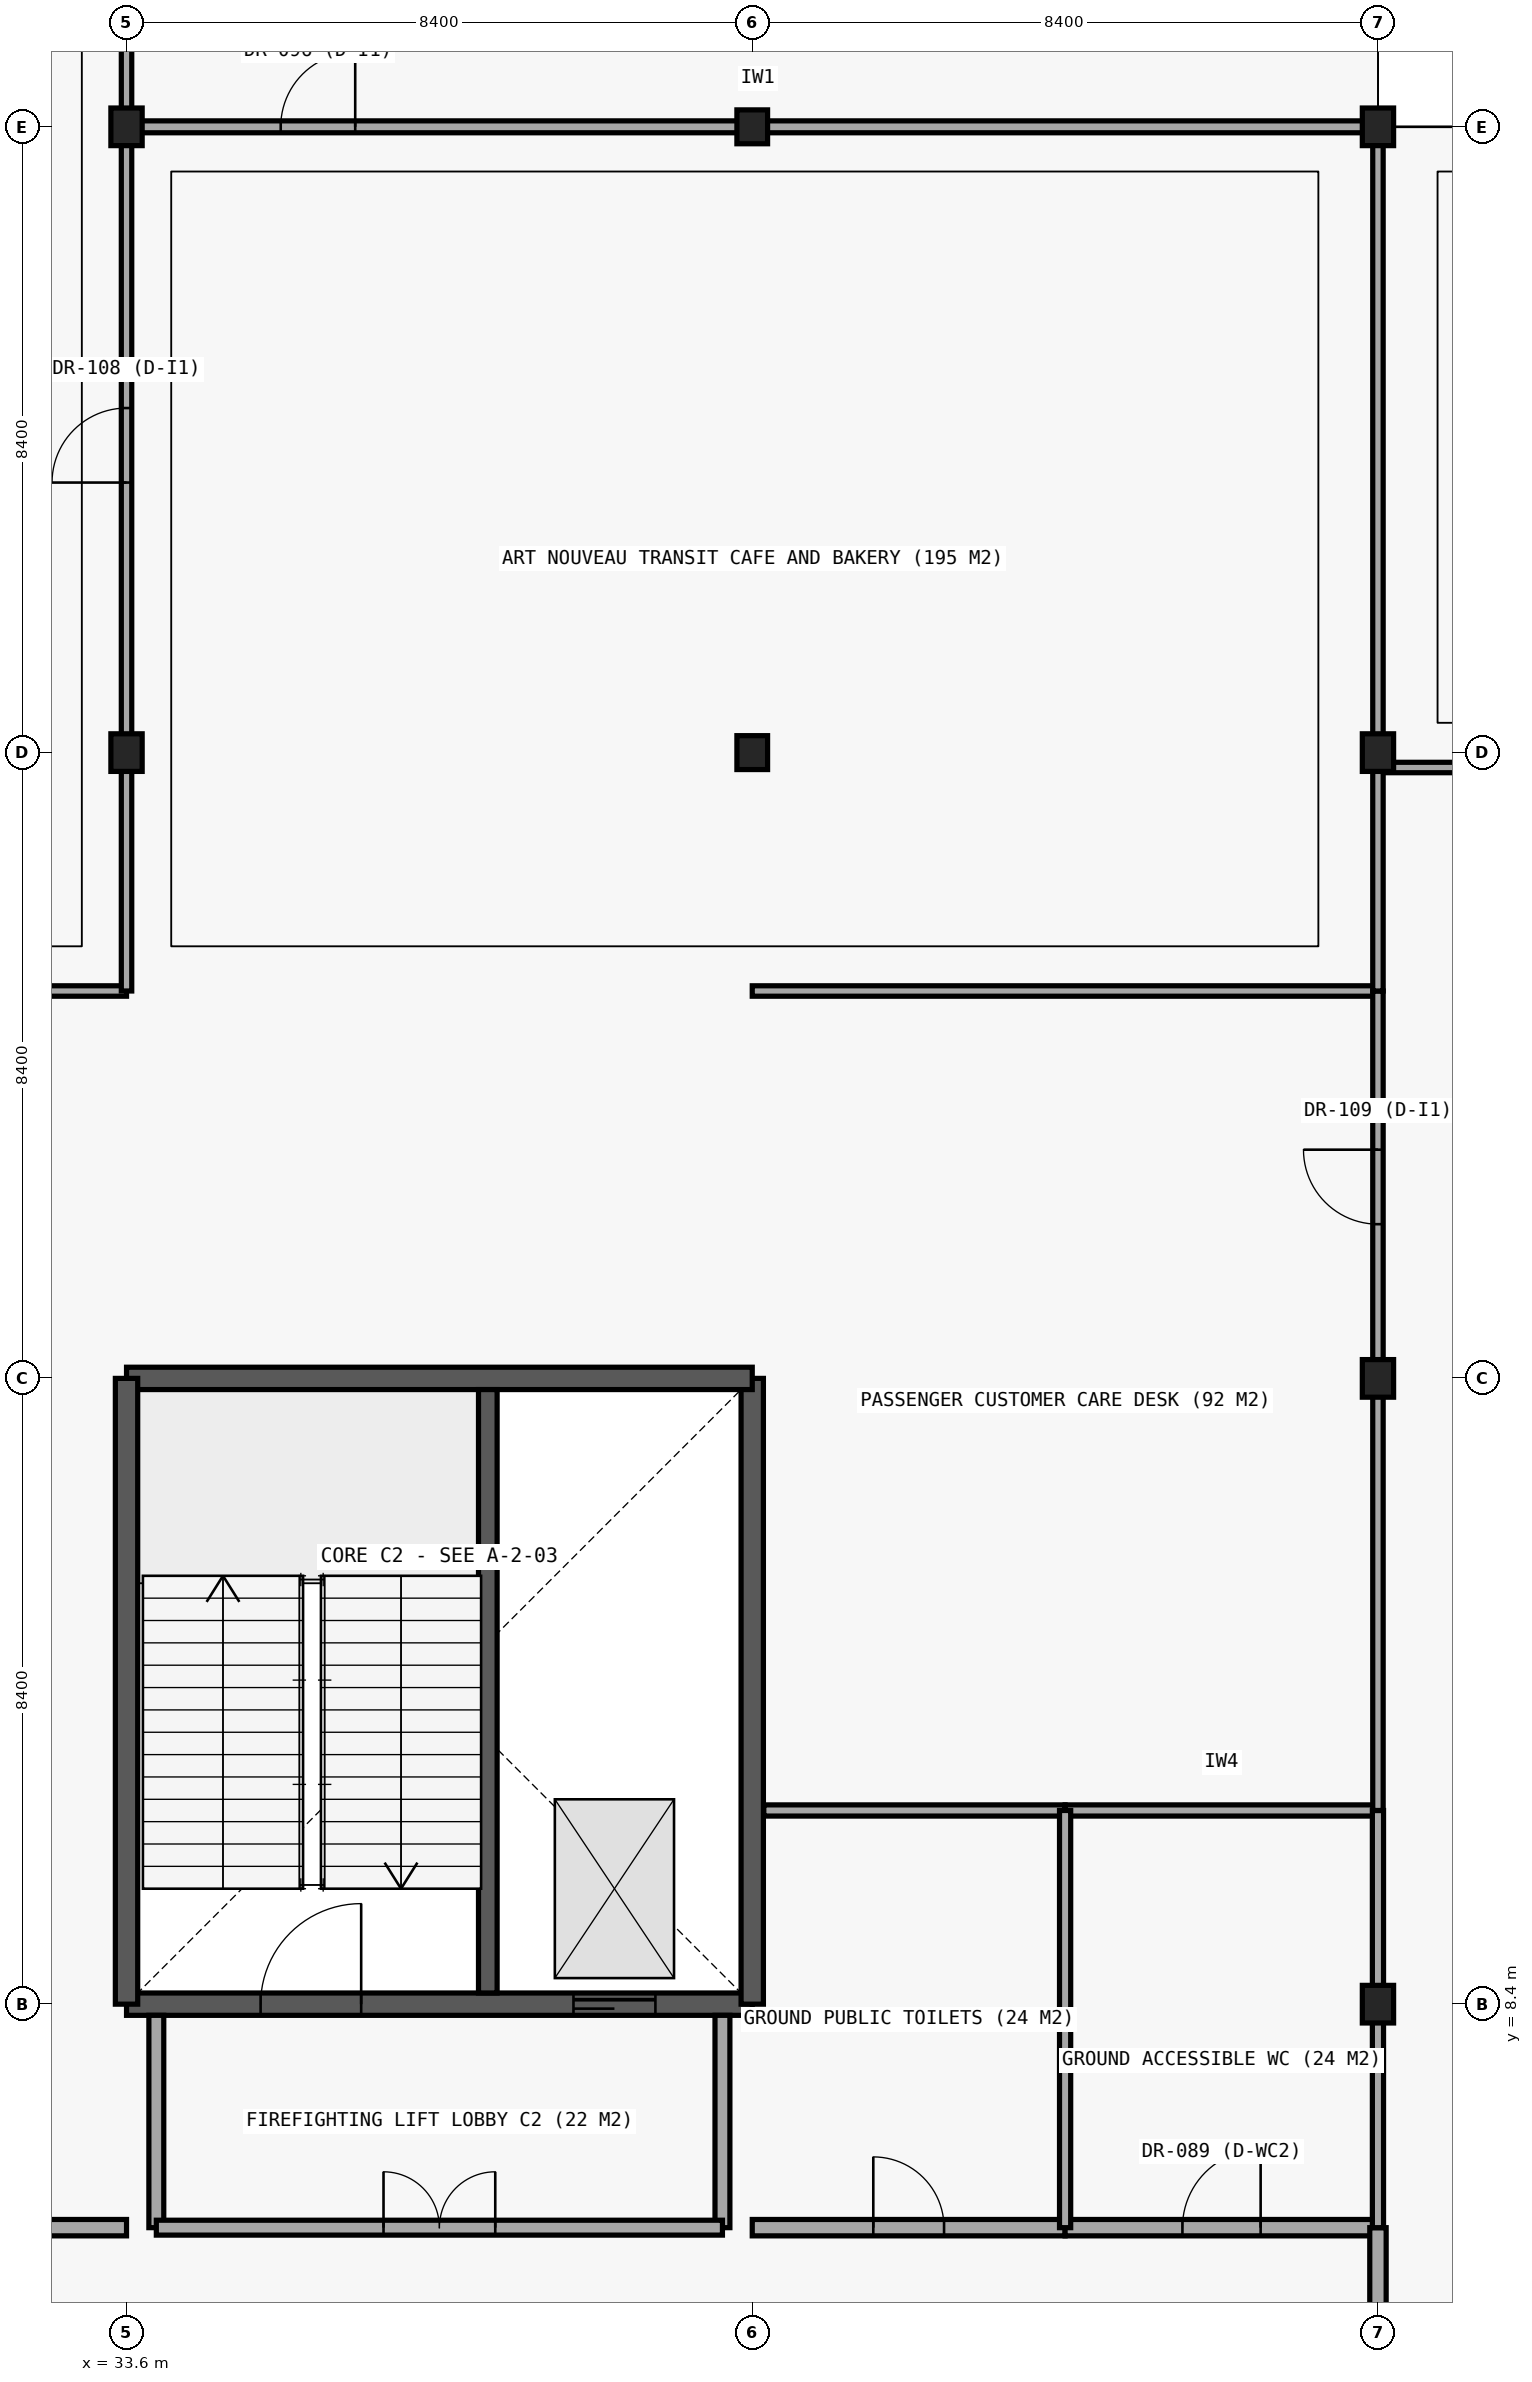
"""IFC4 building model, lengths in metres.
Left out: names, types, materials, properties, quantities, classifications, styles, units other than length and angle.
Written with IfcOpenShell. Run it as: python <this file> out.ifc"""

import sys

from ifc_helpers import new_model, si_unit, direction, frame, frame_2d, origin, origin_2d, place, context, subcontext, project, spatial, rectangle, i_section, extrude, element, fill, save


model = new_model("IFC4")
c1 = context("Model", 3, precision=1e-05, world=origin(), true_north=direction((0.0, 1.0)))
c2 = subcontext(c1, "Body", "Model", "MODEL_VIEW")
j1 = project(units=[si_unit("LENGTHUNIT", "METRE"), si_unit("PLANEANGLEUNIT", "RADIAN")], contexts=[c1])
p1 = place(None, origin())
s1 = spatial("IfcSite", under=j1, at=p1, CompositionType="ELEMENT")
p2 = place(p1, origin())
s2 = spatial("IfcBuilding", under=s1, at=p2, CompositionType="ELEMENT")
p3 = place(p2, origin())
s3 = spatial("IfcBuildingStorey", under=s2, at=p3, CompositionType="ELEMENT", Elevation=0.0)
p4 = place(p3, frame((33.6, 8.4, 0.0), z_axis=(0.0, 0.0, 1.0), x_axis=(1.0, 0.0, 0.0)))
e1 = element("IfcWall", 1, at=p4, inside=s3, PredefinedType="SHEAR", context=c2, shape_type="SweptSolid", body=[
    extrude(rectangle(XDim=8.4, YDim=0.3, at=frame_2d((4.2, 0.0))), origin(), (0.0, 0.0, 1.0), 4.8),
])
p5 = place(p4, frame((1.8, 0.0, 0.0)))
e2 = element("IfcOpeningElement", 2, at=p5, cuts=e1, PredefinedType="OPENING", context=c2, shape_type="SweptSolid", body=[
    extrude(rectangle(XDim=1.35, YDim=2.2, at=frame_2d((0.675, 1.1))), frame((0.0, 0.16, 0.0), z_axis=(0.0, -1.0, 0.0), x_axis=(1.0, 0.0, 0.0)), (0.0, 0.0, 1.0), 0.32),
])
p6 = place(p4, frame((6.0, 0.0, 0.0)))
e3 = element("IfcOpeningElement", 3, at=p6, cuts=e1, PredefinedType="OPENING", context=c2, shape_type="SweptSolid", body=[
    extrude(rectangle(XDim=1.1, YDim=2.2, at=frame_2d((0.55, 1.1))), frame((0.0, 0.16, 0.0), z_axis=(0.0, -1.0, 0.0), x_axis=(1.0, 0.0, 0.0)), (0.0, 0.0, 1.0), 0.32),
])
p7 = place(p3, frame((42.0, 8.4, 0.0), z_axis=(0.0, 0.0, 1.0), x_axis=(0.0, 1.0, 0.0)))
e4 = element("IfcWall", 4, at=p7, inside=s3, PredefinedType="SHEAR", context=c2, shape_type="SweptSolid", body=[
    extrude(rectangle(XDim=8.4, YDim=0.3, at=frame_2d((4.2, 0.0))), origin(), (0.0, 0.0, 1.0), 4.8),
])
p8 = place(p3, frame((42.0, 16.8, 0.0), z_axis=(0.0, 0.0, 1.0), x_axis=(-1.0, 0.0, 0.0)))
e5 = element("IfcWall", 5, at=p8, inside=s3, PredefinedType="SHEAR", context=c2, shape_type="SweptSolid", body=[
    extrude(rectangle(XDim=8.4, YDim=0.3, at=frame_2d((4.2, 0.0))), origin(), (0.0, 0.0, 1.0), 4.8),
])
p9 = place(p3, frame((33.6, 16.8, 0.0), z_axis=(0.0, 0.0, 1.0), x_axis=(0.0, -1.0, 0.0)))
e6 = element("IfcWall", 6, at=p9, inside=s3, PredefinedType="SHEAR", context=c2, shape_type="SweptSolid", body=[
    extrude(rectangle(XDim=8.4, YDim=0.3, at=frame_2d((4.2, 0.0))), origin(), (0.0, 0.0, 1.0), 4.8),
])
p10 = place(p3, frame((38.45, 8.55, 0.0), z_axis=(0.0, 0.0, 1.0), x_axis=(0.0, 1.0, 0.0)))
e7 = element("IfcWall", 7, at=p10, inside=s3, PredefinedType="SHEAR", context=c2, shape_type="SweptSolid", body=[
    extrude(rectangle(XDim=8.1, YDim=0.25, at=frame_2d((4.05, 0.0))), origin(), (0.0, 0.0, 1.0), 4.8),
])
for number, where, z_axis, x_axis in (
    (8, (33.6, 25.2, 0.0), (0.0, 0.0, 1.0), (1.0, 0.0, 0.0)),
    (9, (33.6, 33.6, 0.0), (0.0, 0.0, 1.0), (1.0, 0.0, 0.0)),
):
    element("IfcColumn", number, at=place(p3, frame(where, z_axis=z_axis, x_axis=x_axis)), inside=s3, PredefinedType="COLUMN", context=c2, shape_type="SweptSolid", body=[
        extrude(i_section(OverallWidth=0.42, OverallDepth=0.505, WebThickness=0.037, FlangeThickness=0.059, FilletRadius=0.015, at=origin_2d()), origin(), (0.0, 0.0, 1.0), 4.8),
    ])
for number, where, z_axis, x_axis in (
    (10, (42.0, 25.2, 0.0), (0.0, 0.0, 1.0), (1.0, 0.0, 0.0)),
    (11, (42.0, 33.6, 0.0), (0.0, 0.0, 1.0), (1.0, 0.0, 0.0)),
):
    element("IfcColumn", number, at=place(p3, frame(where, z_axis=z_axis, x_axis=x_axis)), inside=s3, PredefinedType="COLUMN", context=c2, shape_type="SweptSolid", body=[
        extrude(i_section(OverallWidth=0.412, OverallDepth=0.455, WebThickness=0.031, FlangeThickness=0.049, FilletRadius=0.015, at=origin_2d()), origin(), (0.0, 0.0, 1.0), 4.8),
    ])
for number, where, z_axis, x_axis in (
    (12, (50.4, 8.4, 0.0), (0.0, 0.0, 1.0), (1.0, 0.0, 0.0)),
    (13, (50.4, 16.8, 0.0), (0.0, 0.0, 1.0), (1.0, 0.0, 0.0)),
    (14, (50.4, 25.2, 0.0), (0.0, 0.0, 1.0), (1.0, 0.0, 0.0)),
    (15, (50.4, 33.6, 0.0), (0.0, 0.0, 1.0), (1.0, 0.0, 0.0)),
):
    element("IfcColumn", number, at=place(p3, frame(where, z_axis=z_axis, x_axis=x_axis)), inside=s3, PredefinedType="COLUMN", context=c2, shape_type="SweptSolid", body=[
        extrude(i_section(OverallWidth=0.42, OverallDepth=0.505, WebThickness=0.037, FlangeThickness=0.059, FilletRadius=0.015, at=origin_2d()), origin(), (0.0, 0.0, 1.0), 4.8),
    ])
for number, where, z_axis, x_axis in (
    (16, (34.0, 5.4, 0.0), (0.0, 0.0, 1.0), (0.0, 1.0, 0.0)),
    (17, (41.6, 5.4, 0.0), (0.0, 0.0, 1.0), (0.0, 1.0, 0.0)),
):
    element("IfcWall", number, at=place(p3, frame(where, z_axis=z_axis, x_axis=x_axis)), inside=s3, PredefinedType="PARTITIONING", context=c2, shape_type="SweptSolid", body=[
        extrude(rectangle(XDim=2.85, YDim=0.2, at=frame_2d((1.425, 0.0))), origin(), (0.0, 0.0, 1.0), 4.09),
    ])
p11 = place(p3, frame((34.0, 5.4, 0.0), z_axis=(0.0, 0.0, 1.0), x_axis=(1.0, 0.0, 0.0)))
e18 = element("IfcWall", 18, at=p11, inside=s3, PredefinedType="PARTITIONING", context=c2, shape_type="SweptSolid", body=[
    extrude(rectangle(XDim=7.6, YDim=0.2, at=frame_2d((3.8, 0.0))), origin(), (0.0, 0.0, 1.0), 4.12),
])
p12 = place(p11, frame((3.05, 0.0, 0.0)))
e19 = element("IfcOpeningElement", 19, at=p12, cuts=e18, PredefinedType="OPENING", context=c2, shape_type="SweptSolid", body=[
    extrude(rectangle(XDim=1.5, YDim=2.2, at=frame_2d((0.75, 1.1))), frame((0.0, 0.11, 0.0), z_axis=(0.0, -1.0, 0.0), x_axis=(1.0, 0.0, 0.0)), (0.0, 0.0, 1.0), 0.22),
])
p13 = place(p3, frame((22.2, 5.4, 0.0), z_axis=(0.0, 0.0, 1.0), x_axis=(1.0, 0.0, 0.0)))
e20 = element("IfcWall", 20, at=p13, inside=s3, PredefinedType="PARTITIONING", context=c2, shape_type="SweptSolid", body=[
    extrude(rectangle(XDim=11.4, YDim=0.22, at=frame_2d((5.7, 0.0))), origin(), (0.0, 0.0, 1.0), 4.1),
])
p14 = place(p3, frame((42.0, 5.4, 0.0), z_axis=(0.0, 0.0, 1.0), x_axis=(1.0, 0.0, 0.0)))
e21 = element("IfcWall", 21, at=p14, inside=s3, PredefinedType="PARTITIONING", context=c2, shape_type="SweptSolid", body=[
    extrude(rectangle(XDim=4.2, YDim=0.22, at=frame_2d((2.1, 0.0))), origin(), (0.0, 0.0, 1.0), 4.1),
])
p15 = place(p14, frame((1.625, 0.0, 0.0)))
e22 = element("IfcOpeningElement", 22, at=p15, cuts=e21, PredefinedType="OPENING", context=c2, shape_type="SweptSolid", body=[
    extrude(rectangle(XDim=0.95, YDim=2.1, at=frame_2d((0.475, 1.05))), frame((0.0, 0.12, 0.0), z_axis=(0.0, -1.0, 0.0), x_axis=(1.0, 0.0, 0.0)), (0.0, 0.0, 1.0), 0.24),
])
p16 = place(p3, frame((46.2, 5.4, 0.0), z_axis=(0.0, 0.0, 1.0), x_axis=(1.0, 0.0, 0.0)))
e23 = element("IfcWall", 23, at=p16, inside=s3, PredefinedType="PARTITIONING", context=c2, shape_type="SweptSolid", body=[
    extrude(rectangle(XDim=4.2, YDim=0.22, at=frame_2d((2.1, 0.0))), origin(), (0.0, 0.0, 1.0), 4.1),
])
p17 = place(p16, frame((1.575, 0.0, 0.0)))
e24 = element("IfcOpeningElement", 24, at=p17, cuts=e23, PredefinedType="OPENING", context=c2, shape_type="SweptSolid", body=[
    extrude(rectangle(XDim=1.05, YDim=2.15, at=frame_2d((0.525, 1.075))), frame((0.0, 0.12, 0.0), z_axis=(0.0, -1.0, 0.0), x_axis=(1.0, 0.0, 0.0)), (0.0, 0.0, 1.0), 0.24),
])
p18 = place(p3, frame((42.155, 11.0, 0.0), z_axis=(0.0, 0.0, 1.0), x_axis=(1.0, 0.0, 0.0)))
e25 = element("IfcWall", 25, at=p18, inside=s3, PredefinedType="PARTITIONING", context=c2, shape_type="SweptSolid", body=[
    extrude(rectangle(XDim=4.045, YDim=0.15, at=frame_2d((2.022, 0.0))), origin(), (0.0, 0.0, 1.0), 4.1),
])
p19 = place(p3, frame((46.2, 11.0, 0.0), z_axis=(0.0, 0.0, 1.0), x_axis=(1.0, 0.0, 0.0)))
e26 = element("IfcWall", 26, at=p19, inside=s3, PredefinedType="PARTITIONING", context=c2, shape_type="SweptSolid", body=[
    extrude(rectangle(XDim=4.2, YDim=0.15, at=frame_2d((2.1, 0.0))), origin(), (0.0, 0.0, 1.0), 4.1),
])
p20 = place(p3, frame((22.2, 22.0, 0.0), z_axis=(0.0, 0.0, 1.0), x_axis=(1.0, 0.0, 0.0)))
e27 = element("IfcWall", 27, at=p20, inside=s3, PredefinedType="PARTITIONING", context=c2, shape_type="SweptSolid", body=[
    extrude(rectangle(XDim=11.4, YDim=0.14, at=frame_2d((5.7, 0.0))), origin(), (0.0, 0.0, 1.0), 4.1),
])
p21 = place(p3, frame((42.0, 22.0, 0.0), z_axis=(0.0, 0.0, 1.0), x_axis=(1.0, 0.0, 0.0)))
e28 = element("IfcWall", 28, at=p21, inside=s3, PredefinedType="PARTITIONING", context=c2, shape_type="SweptSolid", body=[
    extrude(rectangle(XDim=8.4, YDim=0.14, at=frame_2d((4.2, 0.0))), origin(), (0.0, 0.0, 1.0), 4.1),
])
p22 = place(p3, frame((50.4, 25.0, 0.0), z_axis=(0.0, 0.0, 1.0), x_axis=(1.0, 0.0, 0.0)))
e29 = element("IfcWall", 29, at=p22, inside=s3, PredefinedType="PARTITIONING", context=c2, shape_type="SweptSolid", body=[
    extrude(rectangle(XDim=8.55, YDim=0.14, at=frame_2d((4.275, 0.0))), origin(), (0.0, 0.0, 1.0), 4.1),
])
p23 = place(p3, frame((33.75, 33.6, 0.0), z_axis=(0.0, 0.0, 1.0), x_axis=(1.0, 0.0, 0.0)))
e30 = element("IfcWall", 30, at=p23, inside=s3, PredefinedType="PARTITIONING", context=c2, shape_type="SweptSolid", body=[
    extrude(rectangle(XDim=16.65, YDim=0.16, at=frame_2d((8.325, 0.0))), origin(), (0.0, 0.0, 1.0), 4.04),
])
p24 = place(p23, frame((1.92, 0.0, 0.0)))
e31 = element("IfcOpeningElement", 31, at=p24, cuts=e30, PredefinedType="OPENING", context=c2, shape_type="SweptSolid", body=[
    extrude(rectangle(XDim=1.0, YDim=2.15, at=frame_2d((0.5, 1.075))), frame((0.0, 0.09, 0.0), z_axis=(0.0, -1.0, 0.0), x_axis=(1.0, 0.0, 0.0)), (0.0, 0.0, 1.0), 0.18),
])
p25 = place(p3, frame((33.6, 22.0, 0.0), z_axis=(0.0, 0.0, 1.0), x_axis=(0.0, 1.0, 0.0)))
e32 = element("IfcWall", 32, at=p25, inside=s3, PredefinedType="PARTITIONING", context=c2, shape_type="SweptSolid", body=[
    extrude(rectangle(XDim=3.0, YDim=0.14, at=frame_2d((1.5, 0.0))), origin(), (0.0, 0.0, 1.0), 4.09),
])
p26 = place(p3, frame((33.6, 25.05, 0.0), z_axis=(0.0, 0.0, 1.0), x_axis=(0.0, 1.0, 0.0)))
e33 = element("IfcWall", 33, at=p26, inside=s3, PredefinedType="PARTITIONING", context=c2, shape_type="SweptSolid", body=[
    extrude(rectangle(XDim=8.55, YDim=0.14, at=frame_2d((4.275, 0.0))), origin(), (0.0, 0.0, 1.0), 4.09),
])
p27 = place(p26, frame((3.775, 0.0, 0.0)))
e34 = element("IfcOpeningElement", 34, at=p27, cuts=e33, PredefinedType="OPENING", context=c2, shape_type="SweptSolid", body=[
    extrude(rectangle(XDim=1.0, YDim=2.15, at=frame_2d((0.5, 1.075))), frame((0.0, 0.08, 0.0), z_axis=(0.0, -1.0, 0.0), x_axis=(1.0, 0.0, 0.0)), (0.0, 0.0, 1.0), 0.16),
])
p28 = place(p3, frame((33.6, 33.6, 0.0), z_axis=(0.0, 0.0, 1.0), x_axis=(0.0, 1.0, 0.0)))
e35 = element("IfcWall", 35, at=p28, inside=s3, PredefinedType="PARTITIONING", context=c2, shape_type="SweptSolid", body=[
    extrude(rectangle(XDim=8.355, YDim=0.14, at=frame_2d((4.177, 0.0))), origin(), (0.0, 0.0, 1.0), 4.09),
])
p29 = place(p3, frame((46.2, 5.4, 0.0), z_axis=(0.0, 0.0, 1.0), x_axis=(0.0, 1.0, 0.0)))
e36 = element("IfcWall", 36, at=p29, inside=s3, PredefinedType="PARTITIONING", context=c2, shape_type="SweptSolid", body=[
    extrude(rectangle(XDim=5.6, YDim=0.15, at=frame_2d((2.8, 0.0))), origin(), (0.0, 0.0, 1.0), 4.1),
])
p30 = place(p3, frame((50.4, 3.415, 0.0), z_axis=(0.0, 0.0, 1.0), x_axis=(0.0, 1.0, 0.0)))
e37 = element("IfcWall", 37, at=p30, inside=s3, PredefinedType="PARTITIONING", context=c2, shape_type="SweptSolid", body=[
    extrude(rectangle(XDim=1.985, YDim=0.22, at=frame_2d((0.992, 0.0))), origin(), (0.0, 0.0, 1.0), 4.1),
])
p31 = place(p3, frame((50.4, 5.4, 0.0), z_axis=(0.0, 0.0, 1.0), x_axis=(0.0, 1.0, 0.0)))
e38 = element("IfcWall", 38, at=p31, inside=s3, PredefinedType="PARTITIONING", context=c2, shape_type="SweptSolid", body=[
    extrude(rectangle(XDim=5.6, YDim=0.15, at=frame_2d((2.8, 0.0))), origin(), (0.0, 0.0, 1.0), 4.1),
])
p32 = place(p3, frame((50.4, 11.0, 0.0), z_axis=(0.0, 0.0, 1.0), x_axis=(0.0, 1.0, 0.0)))
e39 = element("IfcWall", 39, at=p32, inside=s3, PredefinedType="PARTITIONING", context=c2, shape_type="SweptSolid", body=[
    extrude(rectangle(XDim=11.0, YDim=0.14, at=frame_2d((5.5, 0.0))), origin(), (0.0, 0.0, 1.0), 4.1),
])
p33 = place(p32, frame((7.87, 0.0, 0.0)))
e40 = element("IfcOpeningElement", 40, at=p33, cuts=e39, PredefinedType="OPENING", context=c2, shape_type="SweptSolid", body=[
    extrude(rectangle(XDim=1.0, YDim=2.15, at=frame_2d((0.5, 1.075))), frame((0.0, 0.08, 0.0), z_axis=(0.0, -1.0, 0.0), x_axis=(1.0, 0.0, 0.0)), (0.0, 0.0, 1.0), 0.16),
])
p34 = place(p3, frame((50.4, 22.0, 0.0), z_axis=(0.0, 0.0, 1.0), x_axis=(0.0, 1.0, 0.0)))
e41 = element("IfcWall", 41, at=p34, inside=s3, PredefinedType="PARTITIONING", context=c2, shape_type="SweptSolid", body=[
    extrude(rectangle(XDim=3.0, YDim=0.14, at=frame_2d((1.5, 0.0))), origin(), (0.0, 0.0, 1.0), 4.1),
])
p35 = place(p3, frame((50.4, 25.05, 0.0), z_axis=(0.0, 0.0, 1.0), x_axis=(0.0, 1.0, 0.0)))
e42 = element("IfcWall", 42, at=p35, inside=s3, PredefinedType="PARTITIONING", context=c2, shape_type="SweptSolid", body=[
    extrude(rectangle(XDim=8.505, YDim=0.14, at=frame_2d((4.252, 0.0))), origin(), (0.0, 0.0, 1.0), 4.1),
])
p36 = place(p5, origin())
e43 = element("IfcDoor", 43, at=p36, inside=s3, OperationType="SINGLE_SWING_RIGHT", PredefinedType="DOOR", context=c2, shape_type="SweptSolid", body=[
    extrude(rectangle(XDim=1.35, YDim=2.2, at=frame_2d((0.675, 1.1))), frame((0.0, 0.025, 0.0), z_axis=(0.0, -1.0, 0.0), x_axis=(1.0, 0.0, 0.0)), (0.0, 0.0, 1.0), 0.05),
])
fill(e2, e43)
p37 = place(p6, origin())
e44 = element("IfcDoor", 44, at=p37, inside=s3, OperationType="SLIDING_TO_LEFT", PredefinedType="DOOR", context=c2, shape_type="SweptSolid", body=[
    extrude(rectangle(XDim=1.1, YDim=2.2, at=frame_2d((0.55, 1.1))), frame((0.0, 0.025, 0.0), z_axis=(0.0, -1.0, 0.0), x_axis=(1.0, 0.0, 0.0)), (0.0, 0.0, 1.0), 0.05),
])
fill(e3, e44)
p38 = place(p12, origin())
e45 = element("IfcDoor", 45, at=p38, inside=s3, OperationType="DOUBLE_DOOR_SINGLE_SWING", PredefinedType="DOOR", context=c2, shape_type="SweptSolid", body=[
    extrude(rectangle(XDim=1.5, YDim=2.2, at=frame_2d((0.75, 1.1))), frame((0.0, 0.025, 0.0), z_axis=(0.0, -1.0, 0.0), x_axis=(1.0, 0.0, 0.0)), (0.0, 0.0, 1.0), 0.05),
])
fill(e19, e45)
p39 = place(p15, origin())
e46 = element("IfcDoor", 46, at=p39, inside=s3, OperationType="SINGLE_SWING_LEFT", PredefinedType="DOOR", context=c2, shape_type="SweptSolid", body=[
    extrude(rectangle(XDim=0.95, YDim=2.1, at=frame_2d((0.475, 1.05))), frame((0.0, 0.025, 0.0), z_axis=(0.0, -1.0, 0.0), x_axis=(1.0, 0.0, 0.0)), (0.0, 0.0, 1.0), 0.05),
])
fill(e22, e46)
p40 = place(p17, origin())
e47 = element("IfcDoor", 47, at=p40, inside=s3, OperationType="SINGLE_SWING_RIGHT", PredefinedType="DOOR", context=c2, shape_type="SweptSolid", body=[
    extrude(rectangle(XDim=1.05, YDim=2.15, at=frame_2d((0.525, 1.075))), frame((0.0, 0.025, 0.0), z_axis=(0.0, -1.0, 0.0), x_axis=(1.0, 0.0, 0.0)), (0.0, 0.0, 1.0), 0.05),
])
fill(e24, e47)
p41 = place(p24, origin())
e48 = element("IfcDoor", 48, at=p41, inside=s3, OperationType="SINGLE_SWING_RIGHT", PredefinedType="DOOR", context=c2, shape_type="SweptSolid", body=[
    extrude(rectangle(XDim=1.0, YDim=2.15, at=frame_2d((0.5, 1.075))), frame((0.0, 0.025, 0.0), z_axis=(0.0, -1.0, 0.0), x_axis=(1.0, 0.0, 0.0)), (0.0, 0.0, 1.0), 0.05),
])
fill(e31, e48)
p42 = place(p27, origin())
e49 = element("IfcDoor", 49, at=p42, inside=s3, OperationType="SINGLE_SWING_LEFT", PredefinedType="DOOR", context=c2, shape_type="SweptSolid", body=[
    extrude(rectangle(XDim=1.0, YDim=2.15, at=frame_2d((0.5, 1.075))), frame((0.0, 0.025, 0.0), z_axis=(0.0, -1.0, 0.0), x_axis=(1.0, 0.0, 0.0)), (0.0, 0.0, 1.0), 0.05),
])
fill(e34, e49)
p43 = place(p33, origin())
e50 = element("IfcDoor", 50, at=p43, inside=s3, OperationType="SINGLE_SWING_RIGHT", PredefinedType="DOOR", context=c2, shape_type="SweptSolid", body=[
    extrude(rectangle(XDim=1.0, YDim=2.15, at=frame_2d((0.5, 1.075))), frame((0.0, 0.025, 0.0), z_axis=(0.0, -1.0, 0.0), x_axis=(1.0, 0.0, 0.0)), (0.0, 0.0, 1.0), 0.05),
])
fill(e40, e50)
save(model, sys.argv[1])
